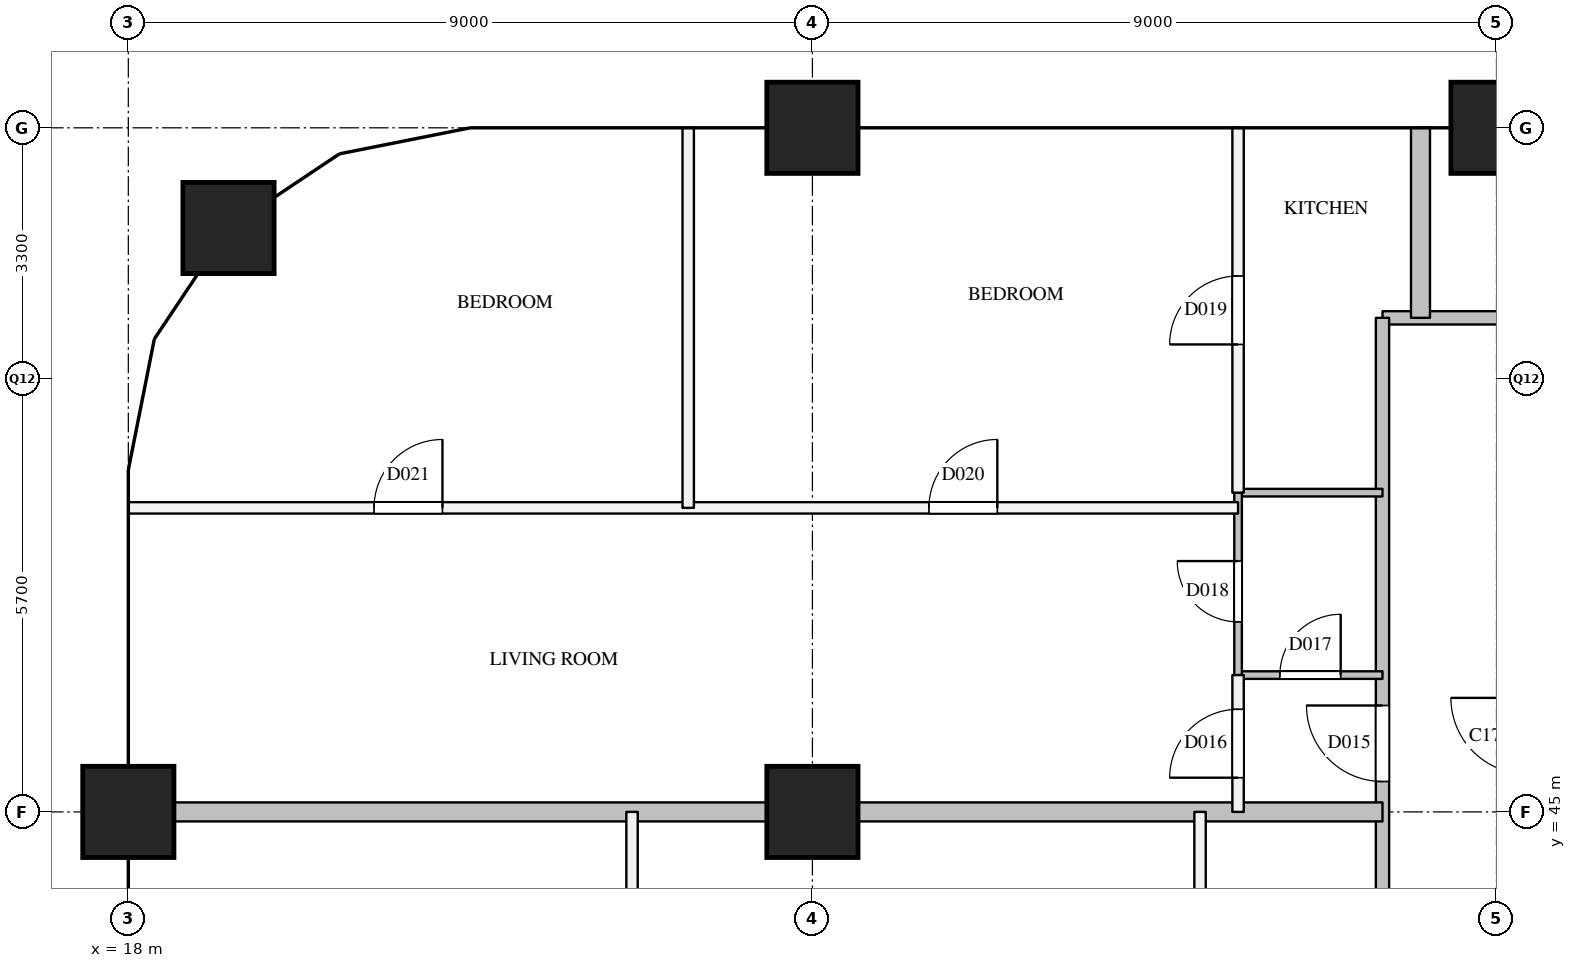
"""IFC4 building model, lengths in metres.
Left out: names, types, materials, properties, quantities, classifications, styles, units other than length and angle.
Written with IfcOpenShell. Run it as: python <this file> out.ifc"""

import sys

from ifc_helpers import new_model, si_unit, direction, frame, frame_2d, origin, origin_2d, place, context, subcontext, project, spatial, rectangle, extrude, element, fill, save


model = new_model("IFC4")
c1 = context("Model", 3, precision=1e-05, world=origin(), true_north=direction((0.0, 1.0)))
c2 = subcontext(c1, "Body", "Model", "MODEL_VIEW")
j1 = project(units=[si_unit("LENGTHUNIT", "METRE"), si_unit("PLANEANGLEUNIT", "RADIAN")], contexts=[c1])
p1 = place(None, origin())
s1 = spatial("IfcSite", under=j1, at=p1, CompositionType="ELEMENT")
p2 = place(p1, origin())
s2 = spatial("IfcBuilding", under=s1, at=p2, CompositionType="ELEMENT")
p3 = place(p2, frame((0.0, 0.0, 238.4)))
s3 = spatial("IfcBuildingStorey", under=s2, at=p3, CompositionType="ELEMENT", Elevation=238.4)
for number, where, z_axis, x_axis in (
    (1, (18.0, 45.0, 0.0), (0.0, 0.0, 1.0), (1.0, 0.0, 0.0)),
    (2, (19.318, 52.682, 0.0), (0.0, 0.0, 1.0), (1.0, 0.0, 0.0)),
    (3, (27.0, 45.0, 0.0), (0.0, 0.0, 1.0), (1.0, 0.0, 0.0)),
    (4, (27.0, 54.0, 0.0), (0.0, 0.0, 1.0), (1.0, 0.0, 0.0)),
    (5, (36.0, 54.0, 0.0), (0.0, 0.0, 1.0), (1.0, 0.0, 0.0)),
):
    element("IfcColumn", number, at=place(p3, frame(where, z_axis=z_axis, x_axis=x_axis)), inside=s3, PredefinedType="COLUMN", context=c2, shape_type="SweptSolid", body=[
        extrude(rectangle(XDim=1.2, YDim=1.2, at=origin_2d()), origin(), (0.0, 0.0, 1.0), 3.9),
    ])
p4 = place(p3, frame((34.5, 51.5, 0.0), z_axis=(0.0, 0.0, 1.0), x_axis=(1.0, 0.0, 0.0)))
e6 = element("IfcWall", 6, at=p4, inside=s3, PredefinedType="PARTITIONING", context=c2, shape_type="SweptSolid", body=[
    extrude(rectangle(XDim=15.4, YDim=0.175, at=frame_2d((7.7, 0.0))), origin(), (0.0, 0.0, 1.0), 3.6),
])
p5 = place(p4, frame((12.45, 0.0, 0.0)))
e7 = element("IfcOpeningElement", 7, at=p5, cuts=e6, PredefinedType="OPENING", context=c2, shape_type="SweptSolid", body=[
    extrude(rectangle(XDim=1.0, YDim=2.1, at=frame_2d((0.5, 1.05))), frame((0.0, 0.097, 0.0), z_axis=(0.0, -1.0, 0.0), x_axis=(1.0, 0.0, 0.0)), (0.0, 0.0, 1.0), 0.195),
])
p6 = place(p4, frame((5.05, 0.0, 0.0)))
e8 = element("IfcOpeningElement", 8, at=p6, cuts=e6, PredefinedType="OPENING", context=c2, shape_type="SweptSolid", body=[
    extrude(rectangle(XDim=0.9, YDim=2.1, at=frame_2d((0.45, 1.05))), frame((0.0, 0.097, 0.0), z_axis=(0.0, -1.0, 0.0), x_axis=(1.0, 0.0, 0.0)), (0.0, 0.0, 1.0), 0.195),
])
p7 = place(p3, frame((34.5, 28.5, 0.0), z_axis=(0.0, 0.0, 1.0), x_axis=(0.0, 1.0, 0.0)))
e9 = element("IfcWall", 9, at=p7, inside=s3, PredefinedType="PARTITIONING", context=c2, shape_type="SweptSolid", body=[
    extrude(rectangle(XDim=23.0, YDim=0.175, at=frame_2d((11.5, 0.0))), origin(), (0.0, 0.0, 1.0), 3.6),
])
p8 = place(p7, frame((5.1, 0.0, 0.0)))
e10 = element("IfcOpeningElement", 10, at=p8, cuts=e9, PredefinedType="OPENING", context=c2, shape_type="SweptSolid", body=[
    extrude(rectangle(XDim=1.0, YDim=2.1, at=frame_2d((0.5, 1.05))), frame((0.0, 0.097, 0.0), z_axis=(0.0, -1.0, 0.0), x_axis=(1.0, 0.0, 0.0)), (0.0, 0.0, 1.0), 0.195),
])
p9 = place(p7, frame((6.9, 0.0, 0.0)))
e11 = element("IfcOpeningElement", 11, at=p9, cuts=e9, PredefinedType="OPENING", context=c2, shape_type="SweptSolid", body=[
    extrude(rectangle(XDim=1.0, YDim=2.1, at=frame_2d((0.5, 1.05))), frame((0.0, 0.097, 0.0), z_axis=(0.0, -1.0, 0.0), x_axis=(1.0, 0.0, 0.0)), (0.0, 0.0, 1.0), 0.195),
])
p10 = place(p7, frame((16.9, 0.0, 0.0)))
e12 = element("IfcOpeningElement", 12, at=p10, cuts=e9, PredefinedType="OPENING", context=c2, shape_type="SweptSolid", body=[
    extrude(rectangle(XDim=1.0, YDim=2.1, at=frame_2d((0.5, 1.05))), frame((0.0, 0.097, 0.0), z_axis=(0.0, -1.0, 0.0), x_axis=(1.0, 0.0, 0.0)), (0.0, 0.0, 1.0), 0.195),
])
p11 = place(p3, frame((18.0, 49.0, 0.0), z_axis=(0.0, 0.0, 1.0), x_axis=(1.0, 0.0, 0.0)))
e13 = element("IfcWall", 13, at=p11, inside=s3, PredefinedType="PARTITIONING", context=c2, shape_type="SweptSolid", body=[
    extrude(rectangle(XDim=14.6, YDim=0.15, at=frame_2d((7.3, 0.0))), origin(), (0.0, 0.0, 1.0), 2.6),
])
p12 = place(p11, frame((10.533, 0.0, 0.0)))
e14 = element("IfcOpeningElement", 14, at=p12, cuts=e13, PredefinedType="OPENING", context=c2, shape_type="SweptSolid", body=[
    extrude(rectangle(XDim=0.9, YDim=2.1, at=frame_2d((0.45, 1.05))), frame((0.0, 0.085, 0.0), z_axis=(0.0, -1.0, 0.0), x_axis=(1.0, 0.0, 0.0)), (0.0, 0.0, 1.0), 0.17),
])
p13 = place(p11, frame((3.233, 0.0, 0.0)))
e15 = element("IfcOpeningElement", 15, at=p13, cuts=e13, PredefinedType="OPENING", context=c2, shape_type="SweptSolid", body=[
    extrude(rectangle(XDim=0.9, YDim=2.1, at=frame_2d((0.45, 1.05))), frame((0.0, 0.085, 0.0), z_axis=(0.0, -1.0, 0.0), x_axis=(1.0, 0.0, 0.0)), (0.0, 0.0, 1.0), 0.17),
])
p14 = place(p3, frame((24.627, 40.0, 0.0), z_axis=(0.0, 0.0, 1.0), x_axis=(0.0, 1.0, 0.0)))
e16 = element("IfcWall", 16, at=p14, inside=s3, PredefinedType="PARTITIONING", context=c2, shape_type="SweptSolid", body=[
    extrude(rectangle(XDim=5.0, YDim=0.15, at=frame_2d((2.5, 0.0))), origin(), (0.0, 0.0, 1.0), 3.6),
])
p15 = place(p3, frame((25.366, 49.0, 0.0), z_axis=(0.0, 0.0, 1.0), x_axis=(0.0, 1.0, 0.0)))
e17 = element("IfcWall", 17, at=p15, inside=s3, PredefinedType="PARTITIONING", context=c2, shape_type="SweptSolid", body=[
    extrude(rectangle(XDim=5.0, YDim=0.15, at=frame_2d((2.5, 0.0))), origin(), (0.0, 0.0, 1.0), 2.6),
])
p16 = place(p3, frame((32.1, 39.2, 0.0), z_axis=(0.0, 0.0, 1.0), x_axis=(0.0, 1.0, 0.0)))
e18 = element("IfcWall", 18, at=p16, inside=s3, PredefinedType="PARTITIONING", context=c2, shape_type="SweptSolid", body=[
    extrude(rectangle(XDim=5.8, YDim=0.15, at=frame_2d((2.9, 0.0))), origin(), (0.0, 0.0, 1.0), 3.6),
])
p17 = place(p16, frame((2.85, 0.0, 0.0)))
e19 = element("IfcOpeningElement", 19, at=p17, cuts=e18, PredefinedType="OPENING", context=c2, shape_type="SweptSolid", body=[
    extrude(rectangle(XDim=0.9, YDim=2.1, at=frame_2d((0.45, 1.05))), frame((0.0, 0.085, 0.0), z_axis=(0.0, -1.0, 0.0), x_axis=(1.0, 0.0, 0.0)), (0.0, 0.0, 1.0), 0.17),
])
p18 = place(p3, frame((32.6, 45.0, 0.0), z_axis=(0.0, 0.0, 1.0), x_axis=(0.0, 1.0, 0.0)))
e20 = element("IfcWall", 20, at=p18, inside=s3, PredefinedType="PARTITIONING", context=c2, shape_type="SweptSolid", body=[
    extrude(rectangle(XDim=1.8, YDim=0.15, at=frame_2d((0.9, 0.0))), origin(), (0.0, 0.0, 1.0), 3.6),
])
p19 = place(p18, frame((0.45, 0.0, 0.0)))
e21 = element("IfcOpeningElement", 21, at=p19, cuts=e20, PredefinedType="OPENING", context=c2, shape_type="SweptSolid", body=[
    extrude(rectangle(XDim=0.9, YDim=2.1, at=frame_2d((0.45, 1.05))), frame((0.0, 0.085, 0.0), z_axis=(0.0, -1.0, 0.0), x_axis=(1.0, 0.0, 0.0)), (0.0, 0.0, 1.0), 0.17),
])
p20 = place(p3, frame((32.6, 49.2, 0.0), z_axis=(0.0, 0.0, 1.0), x_axis=(0.0, 1.0, 0.0)))
e22 = element("IfcWall", 22, at=p20, inside=s3, PredefinedType="PARTITIONING", context=c2, shape_type="SweptSolid", body=[
    extrude(rectangle(XDim=4.8, YDim=0.15, at=frame_2d((2.4, 0.0))), origin(), (0.0, 0.0, 1.0), 2.6),
])
p21 = place(p20, frame((1.95, 0.0, 0.0)))
e23 = element("IfcOpeningElement", 23, at=p21, cuts=e22, PredefinedType="OPENING", context=c2, shape_type="SweptSolid", body=[
    extrude(rectangle(XDim=0.9, YDim=2.1, at=frame_2d((0.45, 1.05))), frame((0.0, 0.085, 0.0), z_axis=(0.0, -1.0, 0.0), x_axis=(1.0, 0.0, 0.0)), (0.0, 0.0, 1.0), 0.17),
])
p22 = place(p3, frame((18.0, 45.0, 0.0), z_axis=(0.0, 0.0, 1.0), x_axis=(1.0, 0.0, 0.0)))
e24 = element("IfcWall", 24, at=p22, inside=s3, PredefinedType="PARTITIONING", context=c2, shape_type="SweptSolid", body=[
    extrude(rectangle(XDim=16.5, YDim=0.25, at=frame_2d((8.25, 0.0))), origin(), (0.0, 0.0, 1.0), 3.6),
])
p23 = place(p3, frame((35.0, 51.5, 0.0), z_axis=(0.0, 0.0, 1.0), x_axis=(0.0, 1.0, 0.0)))
e25 = element("IfcWall", 25, at=p23, inside=s3, PredefinedType="PARTITIONING", context=c2, shape_type="SweptSolid", body=[
    extrude(rectangle(XDim=2.5, YDim=0.25, at=frame_2d((1.25, 0.0))), origin(), (0.0, 0.0, 1.0), 2.6),
])
p24 = place(p3, frame((32.6, 46.8, 0.0), z_axis=(0.0, 0.0, 1.0), x_axis=(1.0, 0.0, 0.0)))
e26 = element("IfcWall", 26, at=p24, inside=s3, PredefinedType="PARTITIONING", context=c2, shape_type="SweptSolid", body=[
    extrude(rectangle(XDim=1.9, YDim=0.1, at=frame_2d((0.95, 0.0))), origin(), (0.0, 0.0, 1.0), 3.6),
])
p25 = place(p24, frame((0.55, 0.0, 0.0)))
e27 = element("IfcOpeningElement", 27, at=p25, cuts=e26, PredefinedType="OPENING", context=c2, shape_type="SweptSolid", body=[
    extrude(rectangle(XDim=0.8, YDim=2.1, at=frame_2d((0.4, 1.05))), frame((0.0, 0.06, 0.0), z_axis=(0.0, -1.0, 0.0), x_axis=(1.0, 0.0, 0.0)), (0.0, 0.0, 1.0), 0.12),
])
p26 = place(p3, frame((32.6, 49.2, 0.0), z_axis=(0.0, 0.0, 1.0), x_axis=(1.0, 0.0, 0.0)))
e28 = element("IfcWall", 28, at=p26, inside=s3, PredefinedType="PARTITIONING", context=c2, shape_type="SweptSolid", body=[
    extrude(rectangle(XDim=1.9, YDim=0.1, at=frame_2d((0.95, 0.0))), origin(), (0.0, 0.0, 1.0), 3.6),
])
p27 = place(p3, frame((32.6, 46.8, 0.0), z_axis=(0.0, 0.0, 1.0), x_axis=(0.0, 1.0, 0.0)))
e29 = element("IfcWall", 29, at=p27, inside=s3, PredefinedType="PARTITIONING", context=c2, shape_type="SweptSolid", body=[
    extrude(rectangle(XDim=2.4, YDim=0.1, at=frame_2d((1.2, 0.0))), origin(), (0.0, 0.0, 1.0), 3.6),
])
p28 = place(p27, frame((0.7, 0.0, 0.0)))
e30 = element("IfcOpeningElement", 30, at=p28, cuts=e29, PredefinedType="OPENING", context=c2, shape_type="SweptSolid", body=[
    extrude(rectangle(XDim=0.8, YDim=2.1, at=frame_2d((0.4, 1.05))), frame((0.0, 0.06, 0.0), z_axis=(0.0, -1.0, 0.0), x_axis=(1.0, 0.0, 0.0)), (0.0, 0.0, 1.0), 0.12),
])
p29 = place(p10, origin())
e31 = element("IfcDoor", 31, at=p29, inside=s3, OperationType="SINGLE_SWING_RIGHT", PredefinedType="DOOR", context=c2, shape_type="SweptSolid", body=[
    extrude(rectangle(XDim=1.0, YDim=2.1, at=frame_2d((0.5, 1.05))), frame((0.0, 0.025, 0.0), z_axis=(0.0, -1.0, 0.0), x_axis=(1.0, 0.0, 0.0)), (0.0, 0.0, 1.0), 0.05),
])
fill(e12, e31)
p30 = place(p19, origin())
e32 = element("IfcDoor", 32, at=p30, inside=s3, OperationType="SINGLE_SWING_LEFT", PredefinedType="DOOR", context=c2, shape_type="SweptSolid", body=[
    extrude(rectangle(XDim=0.9, YDim=2.1, at=frame_2d((0.45, 1.05))), frame((0.0, 0.025, 0.0), z_axis=(0.0, -1.0, 0.0), x_axis=(1.0, 0.0, 0.0)), (0.0, 0.0, 1.0), 0.05),
])
fill(e21, e32)
p31 = place(p25, origin())
e33 = element("IfcDoor", 33, at=p31, inside=s3, OperationType="SINGLE_SWING_RIGHT", PredefinedType="DOOR", context=c2, shape_type="SweptSolid", body=[
    extrude(rectangle(XDim=0.8, YDim=2.1, at=frame_2d((0.4, 1.05))), frame((0.0, 0.025, 0.0), z_axis=(0.0, -1.0, 0.0), x_axis=(1.0, 0.0, 0.0)), (0.0, 0.0, 1.0), 0.05),
])
fill(e27, e33)
p32 = place(p28, origin())
e34 = element("IfcDoor", 34, at=p32, inside=s3, OperationType="SINGLE_SWING_RIGHT", PredefinedType="DOOR", context=c2, shape_type="SweptSolid", body=[
    extrude(rectangle(XDim=0.8, YDim=2.1, at=frame_2d((0.4, 1.05))), frame((0.0, 0.025, 0.0), z_axis=(0.0, -1.0, 0.0), x_axis=(1.0, 0.0, 0.0)), (0.0, 0.0, 1.0), 0.05),
])
fill(e30, e34)
p33 = place(p21, origin())
e35 = element("IfcDoor", 35, at=p33, inside=s3, OperationType="SINGLE_SWING_LEFT", PredefinedType="DOOR", context=c2, shape_type="SweptSolid", body=[
    extrude(rectangle(XDim=0.9, YDim=2.1, at=frame_2d((0.45, 1.05))), frame((0.0, 0.025, 0.0), z_axis=(0.0, -1.0, 0.0), x_axis=(1.0, 0.0, 0.0)), (0.0, 0.0, 1.0), 0.05),
])
fill(e23, e35)
p34 = place(p12, origin())
e36 = element("IfcDoor", 36, at=p34, inside=s3, OperationType="SINGLE_SWING_RIGHT", PredefinedType="DOOR", context=c2, shape_type="SweptSolid", body=[
    extrude(rectangle(XDim=0.9, YDim=2.1, at=frame_2d((0.45, 1.05))), frame((0.0, 0.025, 0.0), z_axis=(0.0, -1.0, 0.0), x_axis=(1.0, 0.0, 0.0)), (0.0, 0.0, 1.0), 0.05),
])
fill(e14, e36)
p35 = place(p13, origin())
e37 = element("IfcDoor", 37, at=p35, inside=s3, OperationType="SINGLE_SWING_RIGHT", PredefinedType="DOOR", context=c2, shape_type="SweptSolid", body=[
    extrude(rectangle(XDim=0.9, YDim=2.1, at=frame_2d((0.45, 1.05))), frame((0.0, 0.025, 0.0), z_axis=(0.0, -1.0, 0.0), x_axis=(1.0, 0.0, 0.0)), (0.0, 0.0, 1.0), 0.05),
])
fill(e15, e37)
save(model, sys.argv[1])
